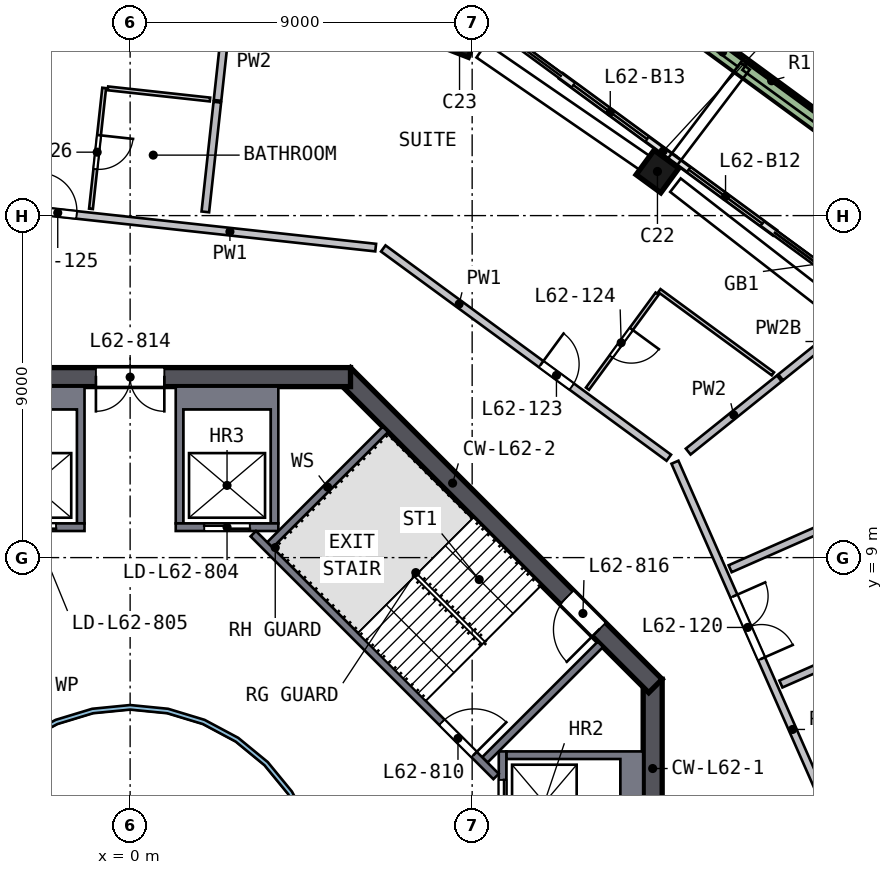
"""IFC4 building model, lengths in metres.
Left out: names, types, materials, properties, quantities, classifications, styles, units other than length and angle.
Written with IfcOpenShell. Run it as: python <this file> out.ifc"""

import sys

from ifc_helpers import new_model, si_unit, direction, frame, frame_2d, origin, origin_2d, place, context, subcontext, project, spatial, polyline, rectangle, outline, extrude, element, fill, save


model = new_model("IFC4")
c1 = context("Model", 3, precision=1e-05, world=origin(), true_north=direction((0.0, 1.0)))
c2 = subcontext(c1, "Body", "Model", "MODEL_VIEW")
j1 = project(units=[si_unit("LENGTHUNIT", "METRE"), si_unit("PLANEANGLEUNIT", "RADIAN")], contexts=[c1])
p1 = place(None, origin())
s1 = spatial("IfcSite", under=j1, at=p1, CompositionType="ELEMENT")
p2 = place(p1, origin())
s2 = spatial("IfcBuilding", under=s1, at=p2, CompositionType="ELEMENT")
p3 = place(p2, frame((0.0, 0.0, 252.5)))
s3 = spatial("IfcBuildingStorey", under=s2, at=p3, CompositionType="ELEMENT", Elevation=252.5)
p4 = place(p3, frame((13.986, 19.082, 0.0), z_axis=(-0.09133384, 0.065781659, 0.99364526), x_axis=(-0.80133178, 0.587536537, -0.112553082)))
e1 = element("IfcColumn", 1, at=p4, inside=s3, PredefinedType="COLUMN", context=c2, shape_type="SweptSolid", body=[
    extrude(rectangle(XDim=0.8, YDim=0.8, at=origin_2d()), origin(), (0.0, 0.0, 1.0), 3.21),
])
p5 = place(p3, frame((8.798, 22.636, 0.0), z_axis=(-0.107952091, 0.040976181, 0.99331128), x_axis=(0.925635524, -0.360370814, 0.115463211)))
e2 = element("IfcColumn", 2, at=p5, inside=s3, PredefinedType="COLUMN", context=c2, shape_type="SweptSolid", body=[
    extrude(rectangle(XDim=0.8, YDim=0.8, at=origin_2d()), origin(), (0.0, 0.0, 1.0), 3.211),
])
p6 = place(p3, frame((13.75, -5.799, 0.0), z_axis=(0.0, 0.0, 1.0), x_axis=(0.0, 1.0, 0.0)))
e3 = element("IfcWall", 3, at=p6, inside=s3, PredefinedType="SHEAR", context=c2, shape_type="SweptSolid", body=[
    extrude(rectangle(XDim=11.598, YDim=0.5, at=frame_2d((5.799, 0.0))), origin(), (0.0, 0.0, 1.0), 3.5),
])
p7 = place(p6, frame((4.899, 0.0, 0.0)))
e4 = element("IfcOpeningElement", 4, at=p7, cuts=e3, PredefinedType="OPENING", context=c2, shape_type="SweptSolid", body=[
    extrude(rectangle(XDim=1.8, YDim=2.1, at=frame_2d((0.9, 1.05))), frame((0.0, 0.26, 0.0), z_axis=(0.0, -1.0, 0.0), x_axis=(1.0, 0.0, 0.0)), (0.0, 0.0, 1.0), 0.52),
])
p8 = place(p3, frame((13.823, 5.622, 0.0), z_axis=(0.0, 0.0, 1.0), x_axis=(-0.707106781, 0.707106781, 0.0)))
e5 = element("IfcWall", 5, at=p8, inside=s3, PredefinedType="SHEAR", context=c2, shape_type="SweptSolid", body=[
    extrude(rectangle(XDim=11.598, YDim=0.5, at=frame_2d((5.799, 0.0))), origin(), (0.0, 0.0, 1.0), 3.5),
])
p9 = place(p8, frame((2.099, 0.0, 0.0)))
e6 = element("IfcOpeningElement", 6, at=p9, cuts=e5, PredefinedType="OPENING", context=c2, shape_type="SweptSolid", body=[
    extrude(rectangle(XDim=1.2, YDim=2.1, at=frame_2d((0.6, 1.05))), frame((0.0, 0.26, 0.0), z_axis=(0.0, -1.0, 0.0), x_axis=(1.0, 0.0, 0.0)), (0.0, 0.0, 1.0), 0.52),
])
p10 = place(p3, frame((5.799, 13.75, 0.0), z_axis=(0.0, 0.0, 1.0), x_axis=(-1.0, 0.0, 0.0)))
e7 = element("IfcWall", 7, at=p10, inside=s3, PredefinedType="SHEAR", context=c2, shape_type="SweptSolid", body=[
    extrude(rectangle(XDim=11.598, YDim=0.5, at=frame_2d((5.799, 0.0))), origin(), (0.0, 0.0, 1.0), 3.5),
])
p11 = place(p10, frame((4.899, 0.0, 0.0)))
e8 = element("IfcOpeningElement", 8, at=p11, cuts=e7, PredefinedType="OPENING", context=c2, shape_type="SweptSolid", body=[
    extrude(rectangle(XDim=1.8, YDim=2.1, at=frame_2d((0.9, 1.05))), frame((0.0, 0.26, 0.0), z_axis=(0.0, -1.0, 0.0), x_axis=(1.0, 0.0, 0.0)), (0.0, 0.0, 1.0), 0.52),
])
p12 = place(p3, frame((16.958, 17.554, 0.0), z_axis=(0.0, 0.0, 1.0), x_axis=(-0.806539039, 0.591180835, 0.0)))
e9 = element("IfcWall", 9, at=p12, inside=s3, PredefinedType="SOLIDWALL", context=c2, shape_type="SweptSolid", body=[
    extrude(rectangle(XDim=3.3, YDim=0.15, at=frame_2d((1.65, 0.0))), origin(), (0.0, 0.0, 1.0), 2.525),
])
p13 = place(p12, frame((0.4, 0.0, 0.0)))
e10 = element("IfcOpeningElement", 10, at=p13, cuts=e9, PredefinedType="OPENING", context=c2, shape_type="SweptSolid", body=[
    extrude(rectangle(XDim=2.4, YDim=2.4, at=frame_2d((1.2, 1.2))), frame((0.0, 0.085, 0.0), z_axis=(0.0, -1.0, 0.0), x_axis=(1.0, 0.0, 0.0)), (0.0, 0.0, 1.0), 0.17),
])
p14 = place(p3, frame((14.296, 19.505, 0.0), z_axis=(0.0, 0.0, 1.0), x_axis=(-0.806553373, 0.591161278, 0.0)))
e11 = element("IfcWall", 11, at=p14, inside=s3, PredefinedType="SOLIDWALL", context=c2, shape_type="SweptSolid", body=[
    extrude(rectangle(XDim=3.661, YDim=0.15, at=frame_2d((1.831, 0.0))), origin(), (0.0, 0.0, 1.0), 2.525),
])
p15 = place(p14, frame((0.861, 0.0, 0.0)))
e12 = element("IfcOpeningElement", 12, at=p15, cuts=e11, PredefinedType="OPENING", context=c2, shape_type="SweptSolid", body=[
    extrude(rectangle(XDim=2.4, YDim=2.4, at=frame_2d((1.2, 1.2))), frame((0.0, 0.085, 0.0), z_axis=(0.0, -1.0, 0.0), x_axis=(1.0, 0.0, 0.0)), (0.0, 0.0, 1.0), 0.17),
])
p16 = place(p3, frame((20.924, 18.398, 0.0), z_axis=(0.0, 0.0, 1.0), x_axis=(-0.806549363, 0.591166749, 0.0)))
e13 = element("IfcWall", 13, at=p16, inside=s3, PredefinedType="SOLIDWALL", context=c2, shape_type="SweptSolid", body=[
    extrude(rectangle(XDim=13.224, YDim=0.5, at=frame_2d((6.612, 0.0))), origin(), (0.0, 0.0, 1.0), 0.7),
])
p17 = place(p3, origin())
e14 = element("IfcWall", 14, at=p17, inside=s3, PredefinedType="SOLIDWALL", context=c2, shape_type="SweptSolid", body=[
    extrude(outline(polyline([(13.5, 3.9), (13.5, 1.2), (9.9, 1.2), (9.9, 1.4), (12.9, 1.4), (12.9, 3.7), (9.9, 3.7), (9.9, 3.9), (13.5, 3.9)])), origin(), (0.0, 0.0, 1.0), 3.19),
])
p18 = place(p3, frame((9.8, 1.2, 0.0), z_axis=(0.0, 0.0, 1.0), x_axis=(0.0, 1.0, 0.0)))
e15 = element("IfcWall", 15, at=p18, inside=s3, PredefinedType="SOLIDWALL", context=c2, shape_type="SweptSolid", body=[
    extrude(rectangle(XDim=2.7, YDim=0.2, at=frame_2d((1.35, 0.0))), origin(), (0.0, 0.0, 1.0), 3.19),
])
p19 = place(p18, frame((0.75, 0.0, 0.0)))
e16 = element("IfcOpeningElement", 16, at=p19, cuts=e15, PredefinedType="OPENING", context=c2, shape_type="SweptSolid", body=[
    extrude(rectangle(XDim=1.2, YDim=2.1, at=frame_2d((0.6, 1.05))), frame((0.0, 0.11, 0.0), z_axis=(0.0, -1.0, 0.0), x_axis=(1.0, 0.0, 0.0)), (0.0, 0.0, 1.0), 0.22),
])
p20 = place(p3, origin())
e17 = element("IfcWall", 17, at=p20, inside=s3, PredefinedType="SOLIDWALL", context=c2, shape_type="SweptSolid", body=[
    extrude(outline(polyline([(3.9, 9.9), (3.7, 9.9), (3.7, 12.9), (1.4, 12.9), (1.4, 9.9), (1.2, 9.9), (1.2, 13.5), (3.9, 13.5), (3.9, 9.9)])), origin(), (0.0, 0.0, 1.0), 3.19),
])
p21 = place(p3, frame((1.2, 9.8, 0.0), z_axis=(0.0, 0.0, 1.0), x_axis=(1.0, 0.0, 0.0)))
e18 = element("IfcWall", 18, at=p21, inside=s3, PredefinedType="SOLIDWALL", context=c2, shape_type="SweptSolid", body=[
    extrude(rectangle(XDim=2.7, YDim=0.2, at=frame_2d((1.35, 0.0))), origin(), (0.0, 0.0, 1.0), 3.19),
])
p22 = place(p21, frame((0.75, 0.0, 0.0)))
e19 = element("IfcOpeningElement", 19, at=p22, cuts=e18, PredefinedType="OPENING", context=c2, shape_type="SweptSolid", body=[
    extrude(rectangle(XDim=1.2, YDim=2.1, at=frame_2d((0.6, 1.05))), frame((0.0, 0.11, 0.0), z_axis=(0.0, -1.0, 0.0), x_axis=(1.0, 0.0, 0.0)), (0.0, 0.0, 1.0), 0.22),
])
p23 = place(p3, origin())
e20 = element("IfcWall", 20, at=p23, inside=s3, PredefinedType="SOLIDWALL", context=c2, shape_type="SweptSolid", body=[
    extrude(outline(polyline([(-3.9, 13.5), (-1.2, 13.5), (-1.2, 9.9), (-1.4, 9.9), (-1.4, 12.9), (-3.7, 12.9), (-3.7, 9.9), (-3.9, 9.9), (-3.9, 13.5)])), origin(), (0.0, 0.0, 1.0), 3.19),
])
p24 = place(p3, frame((-1.2, 9.8, 0.0), z_axis=(0.0, 0.0, 1.0), x_axis=(-1.0, 0.0, 0.0)))
e21 = element("IfcWall", 21, at=p24, inside=s3, PredefinedType="SOLIDWALL", context=c2, shape_type="SweptSolid", body=[
    extrude(rectangle(XDim=2.7, YDim=0.2, at=frame_2d((1.35, 0.0))), origin(), (0.0, 0.0, 1.0), 3.19),
])
p25 = place(p24, frame((0.75, 0.0, 0.0)))
e22 = element("IfcOpeningElement", 22, at=p25, cuts=e21, PredefinedType="OPENING", context=c2, shape_type="SweptSolid", body=[
    extrude(rectangle(XDim=1.2, YDim=2.1, at=frame_2d((0.6, 1.05))), frame((0.0, 0.11, 0.0), z_axis=(0.0, -1.0, 0.0), x_axis=(1.0, 0.0, 0.0)), (0.0, 0.0, 1.0), 0.22),
])
p26 = place(p3, frame((3.24, 9.629, 0.0), z_axis=(0.0, 0.0, 1.0), x_axis=(0.707106781, -0.707106781, 0.0)))
e23 = element("IfcWall", 23, at=p26, inside=s3, PredefinedType="SOLIDWALL", context=c2, shape_type="SweptSolid", body=[
    extrude(rectangle(XDim=9.036, YDim=0.2, at=frame_2d((4.518, 0.0))), origin(), (0.0, 0.0, 1.0), 3.19),
])
p27 = place(p26, frame((7.018, 0.0, 0.0)))
e24 = element("IfcOpeningElement", 24, at=p27, cuts=e23, PredefinedType="OPENING", context=c2, shape_type="SweptSolid", body=[
    extrude(rectangle(XDim=1.2, YDim=2.1, at=frame_2d((0.6, 1.05))), frame((0.0, 0.11, 0.0), z_axis=(0.0, -1.0, 0.0), x_axis=(1.0, 0.0, 0.0)), (0.0, 0.0, 1.0), 0.22),
])
for number, where, z_axis, x_axis in (
    (25, (9.334, 3.677, 0.0), (0.0, 0.0, 1.0), (0.707, 0.707, 0.0)),
    (26, (3.677, 9.334, 0.0), (0.0, 0.0, 1.0), (0.707, 0.707, 0.0)),
):
    element("IfcWall", number, at=place(p3, frame(where, z_axis=z_axis, x_axis=x_axis)), inside=s3, PredefinedType="SOLIDWALL", context=c2, shape_type="SweptSolid", body=[
        extrude(rectangle(XDim=4.3, YDim=0.2, at=frame_2d((2.15, 0.0))), origin(), (0.0, 0.0, 1.0), 3.19),
    ])
p28 = place(p3, origin())
e27 = element("IfcWall", 27, at=p28, inside=s3, PredefinedType="SOLIDWALL", context=c2, shape_type="SweptSolid", body=[
    extrude(outline(polyline([(5.021, -0.999), (4.73, -1.959), (4.257, -2.844), (3.62, -3.62), (2.844, -4.257), (1.959, -4.73), (0.999, -5.021), (0.0, -5.12), (-0.999, -5.021), (-1.959, -4.73), (-2.844, -4.257), (-3.62, -3.62), (-4.257, -2.844), (-4.73, -1.959), (-5.021, -0.999), (-5.12, 0.0), (-5.021, 0.999), (-4.73, 1.959), (-4.257, 2.844), (-3.62, 3.62), (-2.844, 4.257), (-1.959, 4.73), (-0.999, 5.021), (0.0, 5.12), (0.999, 5.021), (1.959, 4.73), (2.844, 4.257), (3.62, 3.62), (4.257, 2.844), (4.73, 1.959), (5.021, 0.999), (5.12, 0.0), (5.021, -0.999)]), holes=[polyline([(4.904, 0.976), (4.619, 1.913), (4.157, 2.778), (3.535, 3.535), (2.778, 4.157), (1.913, 4.619), (0.976, 4.904), (0.0, 5.0), (-0.976, 4.904), (-1.913, 4.619), (-2.778, 4.157), (-3.535, 3.535), (-4.157, 2.778), (-4.619, 1.913), (-4.904, 0.976), (-5.0, 0.0), (-4.904, -0.976), (-4.619, -1.913), (-4.157, -2.778), (-3.535, -3.535), (-2.778, -4.157), (-1.913, -4.619), (-0.976, -4.904), (0.0, -5.0), (0.976, -4.904), (1.913, -4.619), (2.778, -4.157), (3.535, -3.535), (4.157, -2.778), (4.619, -1.913), (4.904, -0.976), (5.0, 0.0), (4.904, 0.976)])]), origin(), (0.0, 0.0, 1.0), 3.19),
])
p29 = place(p3, frame((-2.601, 18.148, 0.0), z_axis=(0.0, 0.0, 1.0), x_axis=(0.994076214, -0.108685238, 0.0)))
e28 = element("IfcWall", 28, at=p29, inside=s3, PredefinedType="SOLIDWALL", context=c2, shape_type="SweptSolid", body=[
    extrude(rectangle(XDim=9.115, YDim=0.2, at=frame_2d((4.558, 0.0))), origin(), (0.0, 0.0, 1.0), 3.19),
])
p30 = place(p29, frame((0.2, 0.0, 0.0)))
e29 = element("IfcOpeningElement", 29, at=p30, cuts=e28, PredefinedType="OPENING", context=c2, shape_type="SweptSolid", body=[
    extrude(rectangle(XDim=1.0, YDim=2.1, at=frame_2d((0.5, 1.05))), frame((0.0, 0.11, 0.0), z_axis=(0.0, -1.0, 0.0), x_axis=(1.0, 0.0, 0.0)), (0.0, 0.0, 1.0), 0.22),
])
p31 = place(p3, frame((6.661, 17.135, 0.0), z_axis=(0.0, 0.0, 1.0), x_axis=(0.80654328, -0.591175049, 0.0)))
e30 = element("IfcWall", 30, at=p31, inside=s3, PredefinedType="SOLIDWALL", context=c2, shape_type="SweptSolid", body=[
    extrude(rectangle(XDim=9.316, YDim=0.2, at=frame_2d((4.658, 0.0))), origin(), (0.0, 0.0, 1.0), 3.19),
])
p32 = place(p31, frame((5.15, 0.0, 0.0)))
e31 = element("IfcOpeningElement", 31, at=p32, cuts=e30, PredefinedType="OPENING", context=c2, shape_type="SweptSolid", body=[
    extrude(rectangle(XDim=1.0, YDim=2.1, at=frame_2d((0.5, 1.05))), frame((0.0, 0.11, 0.0), z_axis=(0.0, -1.0, 0.0), x_axis=(1.0, 0.0, 0.0)), (0.0, 0.0, 1.0), 0.22),
])
p33 = place(p3, frame((14.336, 11.51, 0.0), z_axis=(0.0, 0.0, 1.0), x_axis=(0.402913126, -0.915238227, 0.0)))
e32 = element("IfcWall", 32, at=p33, inside=s3, PredefinedType="SOLIDWALL", context=c2, shape_type="SweptSolid", body=[
    extrude(rectangle(XDim=9.517, YDim=0.2, at=frame_2d((4.758, 0.0))), origin(), (0.0, 0.0, 1.0), 3.19),
])
p34 = place(p33, frame((3.85, 0.0, 0.0)))
e33 = element("IfcOpeningElement", 33, at=p34, cuts=e32, PredefinedType="OPENING", context=c2, shape_type="SweptSolid", body=[
    extrude(rectangle(XDim=1.8, YDim=2.1, at=frame_2d((0.9, 1.05))), frame((0.0, 0.11, 0.0), z_axis=(0.0, -1.0, 0.0), x_axis=(1.0, 0.0, 0.0)), (0.0, 0.0, 1.0), 0.22),
])
p35 = place(p3, frame((1.979, 18.098, 0.0), z_axis=(0.0, 0.0, 1.0), x_axis=(0.108752544, 0.994068853, 0.0)))
e34 = element("IfcWall", 34, at=p35, inside=s3, PredefinedType="SOLIDWALL", context=c2, shape_type="SweptSolid", body=[
    extrude(rectangle(XDim=2.905, YDim=0.2, at=frame_2d((1.453, 0.0))), origin(), (0.0, 0.0, 1.0), 3.19),
])
p36 = place(p3, frame((2.3, 21.031, 0.0), z_axis=(0.0, 0.0, 1.0), x_axis=(0.10867934, 0.994076859, 0.0)))
e35 = element("IfcWall", 35, at=p36, inside=s3, PredefinedType="SOLIDWALL", context=c2, shape_type="SweptSolid", body=[
    extrude(rectangle(XDim=2.952, YDim=0.2, at=frame_2d((1.476, 0.0))), origin(), (0.0, 0.0, 1.0), 3.19),
])
p37 = place(p3, frame((14.685, 11.79, 0.0), z_axis=(0.0, 0.0, 1.0), x_axis=(0.779744275, 0.626098127, 0.0)))
e36 = element("IfcWall", 36, at=p37, inside=s3, PredefinedType="SOLIDWALL", context=c2, shape_type="SweptSolid", body=[
    extrude(rectangle(XDim=3.075, YDim=0.2, at=frame_2d((1.537, 0.0))), origin(), (0.0, 0.0, 1.0), 3.19),
])
p38 = place(p3, frame((17.118, 13.744, 0.0), z_axis=(0.0, 0.0, 1.0), x_axis=(0.779776076, 0.626058521, 0.0)))
e37 = element("IfcWall", 37, at=p38, inside=s3, PredefinedType="SOLIDWALL", context=c2, shape_type="SweptSolid", body=[
    extrude(rectangle(XDim=3.011, YDim=0.2, at=frame_2d((1.506, 0.0))), origin(), (0.0, 0.0, 1.0), 2.69),
])
p39 = place(p3, frame((15.788, 8.707, 0.0), z_axis=(0.0, 0.0, 1.0), x_axis=(0.915241254, 0.40290625, 0.0)))
e38 = element("IfcWall", 38, at=p39, inside=s3, PredefinedType="SOLIDWALL", context=c2, shape_type="SweptSolid", body=[
    extrude(rectangle(XDim=15.227, YDim=0.2, at=frame_2d((7.613, 0.0))), origin(), (0.0, 0.0, 1.0), 3.19),
])
p40 = place(p39, frame((4.75, 0.0, 0.0)))
e39 = element("IfcOpeningElement", 39, at=p40, cuts=e38, PredefinedType="OPENING", context=c2, shape_type="SweptSolid", body=[
    extrude(rectangle(XDim=1.0, YDim=2.1, at=frame_2d((0.5, 1.05))), frame((0.0, 0.11, 0.0), z_axis=(0.0, -1.0, 0.0), x_axis=(1.0, 0.0, 0.0)), (0.0, 0.0, 1.0), 0.22),
])
p41 = place(p3, frame((31.06, 11.808, 0.0), z_axis=(0.0, 0.0, 1.0), x_axis=(-0.915247167, -0.402892819, 0.0)))
e40 = element("IfcWall", 40, at=p41, inside=s3, PredefinedType="SOLIDWALL", context=c2, shape_type="SweptSolid", body=[
    extrude(rectangle(XDim=15.227, YDim=0.2, at=frame_2d((7.613, 0.0))), origin(), (0.0, 0.0, 1.0), 3.19),
])
p42 = place(p41, frame((4.8, 0.0, 0.0)))
e41 = element("IfcOpeningElement", 41, at=p42, cuts=e40, PredefinedType="OPENING", context=c2, shape_type="SweptSolid", body=[
    extrude(rectangle(XDim=1.0, YDim=2.1, at=frame_2d((0.5, 1.05))), frame((0.0, 0.11, 0.0), z_axis=(0.0, -1.0, 0.0), x_axis=(1.0, 0.0, 0.0)), (0.0, 0.0, 1.0), 0.22),
])
p43 = place(p3, frame((-0.683, 21.359, 0.0), z_axis=(0.0, 0.0, 1.0), x_axis=(-0.108639421, -0.994081222, 0.0)))
e42 = element("IfcWall", 42, at=p43, inside=s3, PredefinedType="PARTITIONING", context=c2, shape_type="SweptSolid", body=[
    extrude(rectangle(XDim=3.2, YDim=0.1, at=frame_2d((1.6, 0.0))), origin(), (0.0, 0.0, 1.0), 3.19),
])
p44 = place(p43, frame((1.25, 0.0, 0.0)))
e43 = element("IfcOpeningElement", 43, at=p44, cuts=e42, PredefinedType="OPENING", context=c2, shape_type="SweptSolid", body=[
    extrude(rectangle(XDim=0.9, YDim=2.1, at=frame_2d((0.45, 1.05))), frame((0.0, 0.06, 0.0), z_axis=(0.0, -1.0, 0.0), x_axis=(1.0, 0.0, 0.0)), (0.0, 0.0, 1.0), 0.12),
])
p45 = place(p3, frame((-0.583, 21.348, 0.0), z_axis=(0.0, 0.0, 1.0), x_axis=(0.994076272, -0.108684708, 0.0)))
e44 = element("IfcWall", 44, at=p45, inside=s3, PredefinedType="PARTITIONING", context=c2, shape_type="SweptSolid", body=[
    extrude(rectangle(XDim=2.7, YDim=0.1, at=frame_2d((1.35, 0.0))), origin(), (0.0, 0.0, 1.0), 3.19),
])
p46 = place(p3, frame((13.867, 15.945, 0.0), z_axis=(0.0, 0.0, 1.0), x_axis=(-0.591155368, -0.806557704, 0.0)))
e45 = element("IfcWall", 45, at=p46, inside=s3, PredefinedType="PARTITIONING", context=c2, shape_type="SweptSolid", body=[
    extrude(rectangle(XDim=3.1, YDim=0.1, at=frame_2d((1.55, 0.0))), origin(), (0.0, 0.0, 1.0), 3.19),
])
p47 = place(p46, frame((1.15, 0.0, 0.0)))
e46 = element("IfcOpeningElement", 46, at=p47, cuts=e45, PredefinedType="OPENING", context=c2, shape_type="SweptSolid", body=[
    extrude(rectangle(XDim=0.9, YDim=2.1, at=frame_2d((0.45, 1.05))), frame((0.0, 0.06, 0.0), z_axis=(0.0, -1.0, 0.0), x_axis=(1.0, 0.0, 0.0)), (0.0, 0.0, 1.0), 0.12),
])
p48 = place(p3, frame((13.926, 16.026, 0.0), z_axis=(0.0, 0.0, 1.0), x_axis=(0.806587268, -0.59111503, 0.0)))
e47 = element("IfcWall", 47, at=p48, inside=s3, PredefinedType="PARTITIONING", context=c2, shape_type="SweptSolid", body=[
    extrude(rectangle(XDim=3.704, YDim=0.1, at=frame_2d((1.852, 0.0))), origin(), (0.0, 0.0, 1.0), 3.19),
])
p49 = place(p13, origin())
e48 = element("IfcDoor", 48, at=p49, inside=s3, OperationType="SLIDING_TO_RIGHT", PredefinedType="DOOR", context=c2, shape_type="SweptSolid", body=[
    extrude(rectangle(XDim=2.4, YDim=2.4, at=frame_2d((1.2, 1.2))), frame((0.0, 0.025, 0.0), z_axis=(0.0, -1.0, 0.0), x_axis=(1.0, 0.0, 0.0)), (0.0, 0.0, 1.0), 0.05),
])
fill(e10, e48)
p50 = place(p15, origin())
e49 = element("IfcDoor", 49, at=p50, inside=s3, OperationType="SLIDING_TO_LEFT", PredefinedType="DOOR", context=c2, shape_type="SweptSolid", body=[
    extrude(rectangle(XDim=2.4, YDim=2.4, at=frame_2d((1.2, 1.2))), frame((0.0, 0.025, 0.0), z_axis=(0.0, -1.0, 0.0), x_axis=(1.0, 0.0, 0.0)), (0.0, 0.0, 1.0), 0.05),
])
fill(e12, e49)
p51 = place(p19, origin())
e50 = element("IfcDoor", 50, at=p51, inside=s3, OperationType="DOUBLE_DOOR_SLIDING", PredefinedType="DOOR", context=c2, shape_type="SweptSolid", body=[
    extrude(rectangle(XDim=1.2, YDim=2.1, at=frame_2d((0.6, 1.05))), frame((0.0, 0.025, 0.0), z_axis=(0.0, -1.0, 0.0), x_axis=(1.0, 0.0, 0.0)), (0.0, 0.0, 1.0), 0.05),
])
fill(e16, e50)
p52 = place(p22, origin())
e51 = element("IfcDoor", 51, at=p52, inside=s3, OperationType="DOUBLE_DOOR_SLIDING", PredefinedType="DOOR", context=c2, shape_type="SweptSolid", body=[
    extrude(rectangle(XDim=1.2, YDim=2.1, at=frame_2d((0.6, 1.05))), frame((0.0, 0.025, 0.0), z_axis=(0.0, -1.0, 0.0), x_axis=(1.0, 0.0, 0.0)), (0.0, 0.0, 1.0), 0.05),
])
fill(e19, e51)
p53 = place(p25, origin())
e52 = element("IfcDoor", 52, at=p53, inside=s3, OperationType="DOUBLE_DOOR_SLIDING", PredefinedType="DOOR", context=c2, shape_type="SweptSolid", body=[
    extrude(rectangle(XDim=1.2, YDim=2.1, at=frame_2d((0.6, 1.05))), frame((0.0, 0.025, 0.0), z_axis=(0.0, -1.0, 0.0), x_axis=(1.0, 0.0, 0.0)), (0.0, 0.0, 1.0), 0.05),
])
fill(e22, e52)
p54 = place(p27, origin())
e53 = element("IfcDoor", 53, at=p54, inside=s3, OperationType="SINGLE_SWING_RIGHT", PredefinedType="DOOR", context=c2, shape_type="SweptSolid", body=[
    extrude(rectangle(XDim=1.2, YDim=2.1, at=frame_2d((0.6, 1.05))), frame((0.0, 0.025, 0.0), z_axis=(0.0, -1.0, 0.0), x_axis=(1.0, 0.0, 0.0)), (0.0, 0.0, 1.0), 0.05),
])
fill(e24, e53)
p55 = place(p11, origin())
e54 = element("IfcDoor", 54, at=p55, inside=s3, OperationType="DOUBLE_DOOR_SINGLE_SWING", PredefinedType="DOOR", context=c2, shape_type="SweptSolid", body=[
    extrude(rectangle(XDim=1.8, YDim=2.1, at=frame_2d((0.9, 1.05))), frame((0.0, 0.025, 0.0), z_axis=(0.0, -1.0, 0.0), x_axis=(1.0, 0.0, 0.0)), (0.0, 0.0, 1.0), 0.05),
])
fill(e8, e54)
p56 = place(p9, origin())
e55 = element("IfcDoor", 55, at=p56, inside=s3, OperationType="SINGLE_SWING_LEFT", PredefinedType="DOOR", context=c2, shape_type="SweptSolid", body=[
    extrude(rectangle(XDim=1.2, YDim=2.1, at=frame_2d((0.6, 1.05))), frame((0.0, 0.025, 0.0), z_axis=(0.0, -1.0, 0.0), x_axis=(1.0, 0.0, 0.0)), (0.0, 0.0, 1.0), 0.05),
])
fill(e6, e55)
p57 = place(p34, origin())
e56 = element("IfcDoor", 56, at=p57, inside=s3, OperationType="DOUBLE_DOOR_SINGLE_SWING", PredefinedType="DOOR", context=c2, shape_type="SweptSolid", body=[
    extrude(rectangle(XDim=1.8, YDim=2.1, at=frame_2d((0.9, 1.05))), frame((0.0, 0.025, 0.0), z_axis=(0.0, -1.0, 0.0), x_axis=(1.0, 0.0, 0.0)), (0.0, 0.0, 1.0), 0.05),
])
fill(e33, e56)
p58 = place(p32, origin())
e57 = element("IfcDoor", 57, at=p58, inside=s3, OperationType="SINGLE_SWING_LEFT", PredefinedType="DOOR", context=c2, shape_type="SweptSolid", body=[
    extrude(rectangle(XDim=1.0, YDim=2.1, at=frame_2d((0.5, 1.05))), frame((0.0, 0.025, 0.0), z_axis=(0.0, -1.0, 0.0), x_axis=(1.0, 0.0, 0.0)), (0.0, 0.0, 1.0), 0.05),
])
fill(e31, e57)
p59 = place(p47, origin())
e58 = element("IfcDoor", 58, at=p59, inside=s3, OperationType="SINGLE_SWING_LEFT", PredefinedType="DOOR", context=c2, shape_type="SweptSolid", body=[
    extrude(rectangle(XDim=0.9, YDim=2.1, at=frame_2d((0.45, 1.05))), frame((0.0, 0.025, 0.0), z_axis=(0.0, -1.0, 0.0), x_axis=(1.0, 0.0, 0.0)), (0.0, 0.0, 1.0), 0.05),
])
fill(e46, e58)
p60 = place(p30, origin())
e59 = element("IfcDoor", 59, at=p60, inside=s3, OperationType="SINGLE_SWING_LEFT", PredefinedType="DOOR", context=c2, shape_type="SweptSolid", body=[
    extrude(rectangle(XDim=1.0, YDim=2.1, at=frame_2d((0.5, 1.05))), frame((0.0, 0.025, 0.0), z_axis=(0.0, -1.0, 0.0), x_axis=(1.0, 0.0, 0.0)), (0.0, 0.0, 1.0), 0.05),
])
fill(e29, e59)
p61 = place(p44, origin())
e60 = element("IfcDoor", 60, at=p61, inside=s3, OperationType="SINGLE_SWING_LEFT", PredefinedType="DOOR", context=c2, shape_type="SweptSolid", body=[
    extrude(rectangle(XDim=0.9, YDim=2.1, at=frame_2d((0.45, 1.05))), frame((0.0, 0.025, 0.0), z_axis=(0.0, -1.0, 0.0), x_axis=(1.0, 0.0, 0.0)), (0.0, 0.0, 1.0), 0.05),
])
fill(e43, e60)
save(model, sys.argv[1])
